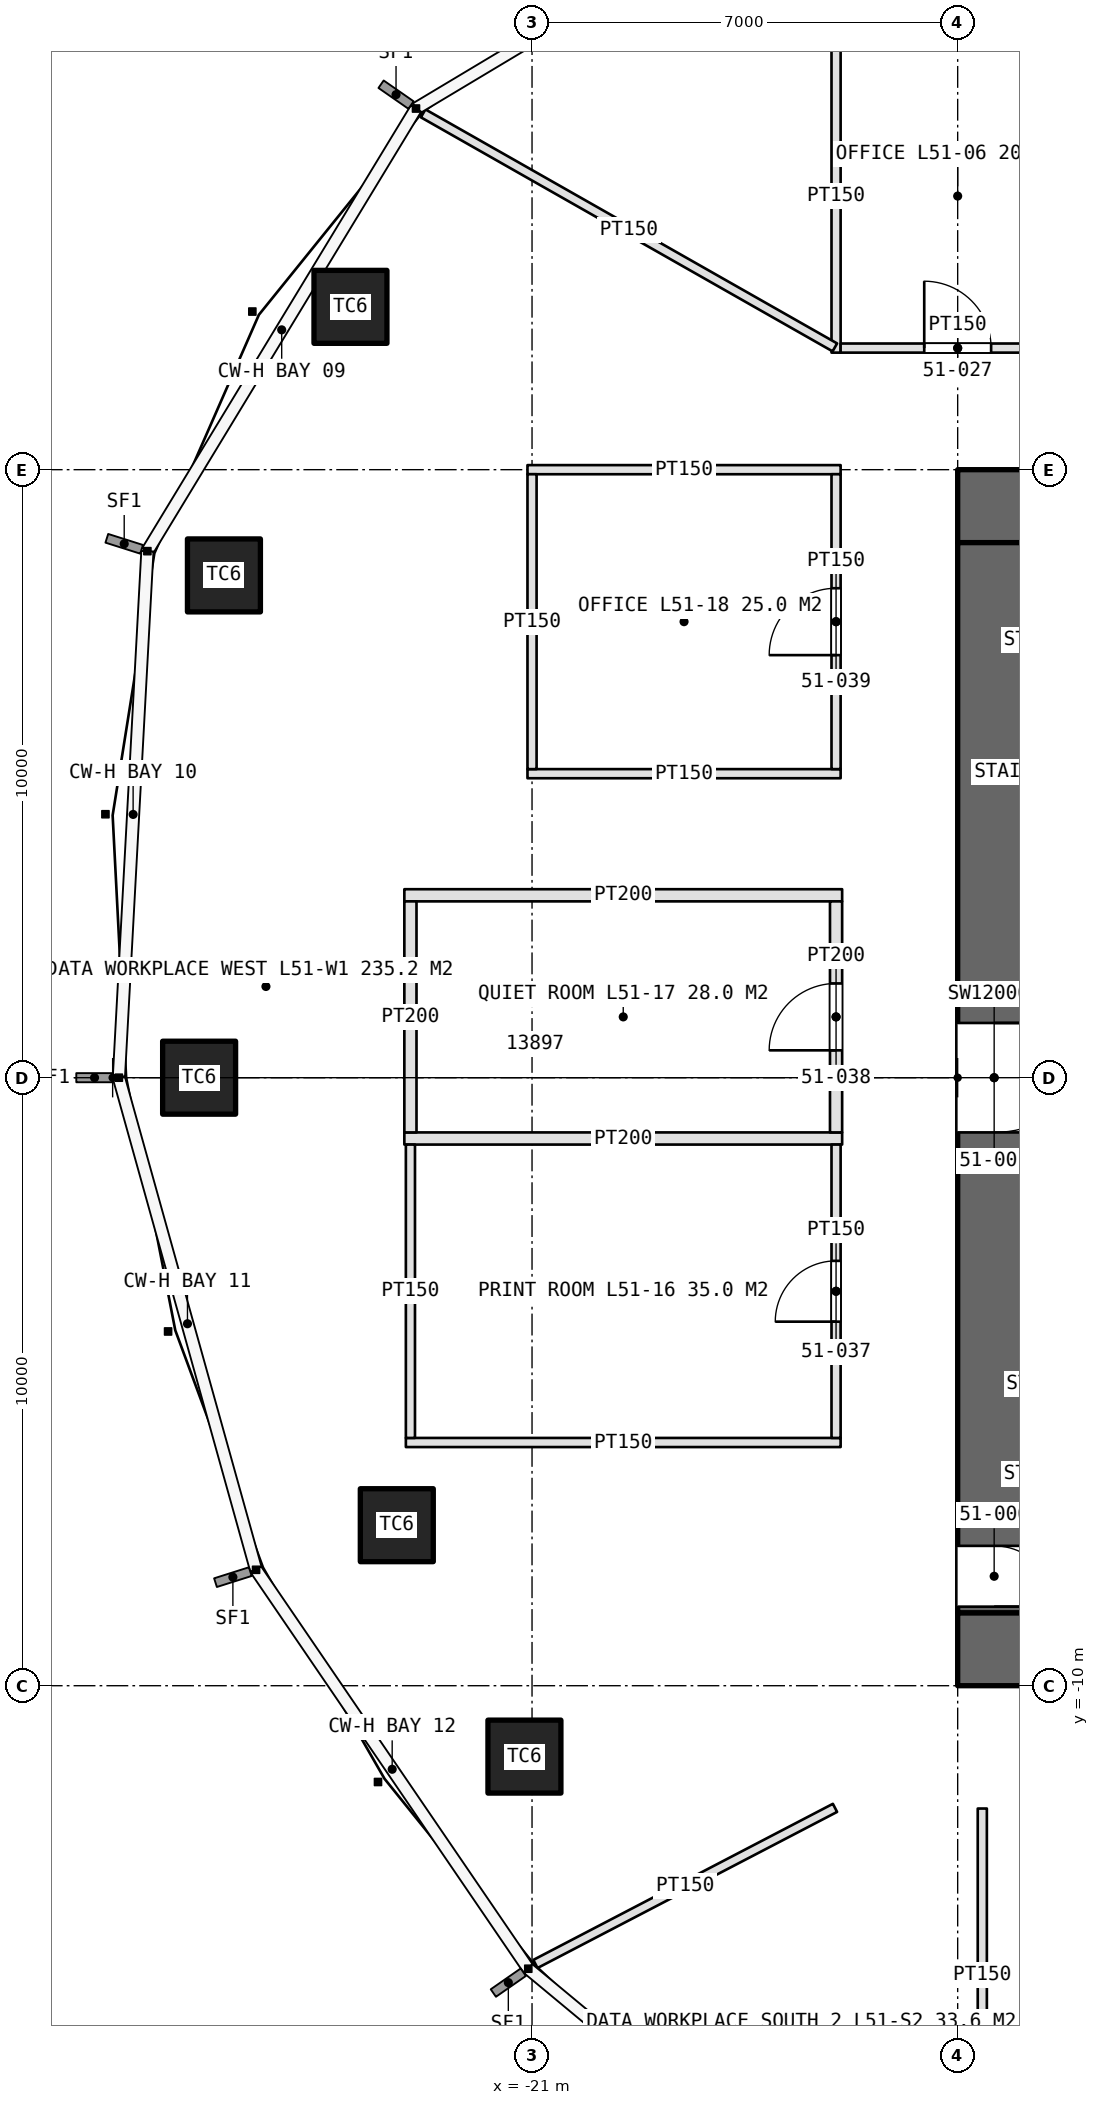
"""IFC4 building model, lengths in metres.
Left out: names, types, materials, properties, quantities, classifications, styles, units other than length and angle.
Written with IfcOpenShell. Run it as: python <this file> out.ifc"""

import sys

from ifc_helpers import new_model, si_unit, direction, frame, frame_2d, origin, origin_2d, place, context, subcontext, project, spatial, rectangle, extrude, element, fill, save


model = new_model("IFC4")
c1 = context("Model", 3, precision=1e-05, world=origin(), true_north=direction((0.0, 1.0)))
c2 = subcontext(c1, "Body", "Model", "MODEL_VIEW")
j1 = project(units=[si_unit("LENGTHUNIT", "METRE"), si_unit("PLANEANGLEUNIT", "RADIAN")], contexts=[c1])
p1 = place(None, origin())
s1 = spatial("IfcSite", under=j1, at=p1, CompositionType="ELEMENT")
p2 = place(p1, origin())
s2 = spatial("IfcBuilding", under=s1, at=p2, CompositionType="ELEMENT")
p3 = place(p2, frame((0.0, 0.0, 232.6)))
s3 = spatial("IfcBuildingStorey", under=s2, at=p3, CompositionType="ELEMENT", Elevation=232.6)
p4 = place(p3, frame((-14.0, -9.4, 0.0), z_axis=(0.0, 0.0, 1.0), x_axis=(1.0, 0.0, 0.0)))
e1 = element("IfcWall", 1, at=p4, inside=s3, PredefinedType="SHEAR", context=c2, shape_type="SweptSolid", body=[
    extrude(rectangle(XDim=28.0, YDim=1.2, at=frame_2d((14.0, 0.0))), origin(), (0.0, 0.0, 1.0), 4.2),
])
p5 = place(p4, frame((22.9, 0.0, 0.0)))
e2 = element("IfcOpeningElement", 2, at=p5, cuts=e1, PredefinedType="OPENING", context=c2, shape_type="SweptSolid", body=[
    extrude(rectangle(XDim=2.2, YDim=2.7, at=frame_2d((1.1, 1.35))), frame((0.0, 0.61, 0.0), z_axis=(0.0, -1.0, 0.0), x_axis=(1.0, 0.0, 0.0)), (0.0, 0.0, 1.0), 1.22),
])
p6 = place(p3, frame((14.0, 9.4, 0.0), z_axis=(0.0, 0.0, 1.0), x_axis=(-1.0, 0.0, 0.0)))
e3 = element("IfcWall", 3, at=p6, inside=s3, PredefinedType="SHEAR", context=c2, shape_type="SweptSolid", body=[
    extrude(rectangle(XDim=28.0, YDim=1.2, at=frame_2d((14.0, 0.0))), origin(), (0.0, 0.0, 1.0), 4.2),
])
p7 = place(p6, frame((24.0, 0.0, 0.0)))
e4 = element("IfcOpeningElement", 4, at=p7, cuts=e3, PredefinedType="OPENING", context=c2, shape_type="SweptSolid", body=[
    extrude(rectangle(XDim=1.0, YDim=2.4, at=frame_2d((0.5, 1.2))), frame((0.0, 0.61, 0.0), z_axis=(0.0, -1.0, 0.0), x_axis=(1.0, 0.0, 0.0)), (0.0, 0.0, 1.0), 1.22),
])
p8 = place(p3, frame((-13.4, 8.8, 0.0), z_axis=(0.0, 0.0, 1.0), x_axis=(0.0, -1.0, 0.0)))
e5 = element("IfcWall", 5, at=p8, inside=s3, PredefinedType="SHEAR", context=c2, shape_type="SweptSolid", body=[
    extrude(rectangle(XDim=17.6, YDim=1.2, at=frame_2d((8.8, 0.0))), origin(), (0.0, 0.0, 1.0), 4.2),
])
p9 = place(p8, frame((7.9, 0.0, 0.0)))
e6 = element("IfcOpeningElement", 6, at=p9, cuts=e5, PredefinedType="OPENING", context=c2, shape_type="SweptSolid", body=[
    extrude(rectangle(XDim=1.8, YDim=2.4, at=frame_2d((0.9, 1.2))), frame((0.0, 0.61, 0.0), z_axis=(0.0, -1.0, 0.0), x_axis=(1.0, 0.0, 0.0)), (0.0, 0.0, 1.0), 1.22),
])
p10 = place(p8, frame((16.5, 0.0, 0.0)))
e7 = element("IfcOpeningElement", 7, at=p10, cuts=e5, PredefinedType="OPENING", context=c2, shape_type="SweptSolid", body=[
    extrude(rectangle(XDim=1.0, YDim=2.4, at=frame_2d((0.5, 1.2))), frame((0.0, 0.61, 0.0), z_axis=(0.0, -1.0, 0.0), x_axis=(1.0, 0.0, 0.0)), (0.0, 0.0, 1.0), 1.22),
])
for number, where, z_axis, x_axis in (
    (8, (-23.986, 12.678, 0.0), (0.0, 0.0, 1.0), (1.0, 0.0, 0.0)),
    (9, (-26.067, 8.261, 0.0), (0.0, 0.0, 1.0), (1.0, 0.0, 0.0)),
    (10, (-26.475, 0.0, 0.0), (0.0, 0.0, 1.0), (1.0, 0.0, 0.0)),
    (11, (-23.224, -7.36, 0.0), (0.0, 0.0, 1.0), (1.0, 0.0, 0.0)),
    (12, (-21.125, -11.166, 0.0), (0.0, 0.0, 1.0), (1.0, 0.0, 0.0)),
):
    element("IfcColumn", number, at=place(p3, frame(where, z_axis=z_axis, x_axis=x_axis)), inside=s3, PredefinedType="COLUMN", context=c2, shape_type="SweptSolid", body=[
        extrude(rectangle(XDim=1.2, YDim=1.2, at=origin_2d()), origin(), (0.0, 0.0, 1.0), 4.2),
    ])
p11 = place(p3, frame((-16.0, 11.925, 0.0), z_axis=(0.0, 0.0, 1.0), x_axis=(0.0, 1.0, 0.0)))
e13 = element("IfcWall", 13, at=p11, inside=s3, PredefinedType="PARTITIONING", context=c2, shape_type="SweptSolid", body=[
    extrude(rectangle(XDim=5.15, YDim=0.15, at=frame_2d((2.575, 0.0))), origin(), (0.0, 0.0, 1.0), 3.0),
])
p12 = place(p3, frame((-15.925, 12.0, 0.0), z_axis=(0.0, 0.0, 1.0), x_axis=(1.0, 0.0, 0.0)))
e14 = element("IfcWall", 14, at=p12, inside=s3, PredefinedType="PARTITIONING", context=c2, shape_type="SweptSolid", body=[
    extrude(rectangle(XDim=3.85, YDim=0.15, at=frame_2d((1.925, 0.0))), origin(), (0.0, 0.0, 1.0), 3.0),
])
p13 = place(p12, frame((1.375, 0.0, 0.0)))
e15 = element("IfcOpeningElement", 15, at=p13, cuts=e14, PredefinedType="OPENING", context=c2, shape_type="SweptSolid", body=[
    extrude(rectangle(XDim=1.1, YDim=2.3, at=frame_2d((0.55, 1.15))), frame((0.0, 0.085, 0.0), z_axis=(0.0, -1.0, 0.0), x_axis=(1.0, 0.0, 0.0)), (0.0, 0.0, 1.0), 0.17),
])
p14 = place(p3, frame((-15.925, -6.0, 0.0), z_axis=(0.0, 0.0, 1.0), x_axis=(-1.0, 0.0, 0.0)))
e16 = element("IfcWall", 16, at=p14, inside=s3, PredefinedType="PARTITIONING", context=c2, shape_type="SweptSolid", body=[
    extrude(rectangle(XDim=7.15, YDim=0.15, at=frame_2d((3.575, 0.0))), origin(), (0.0, 0.0, 1.0), 3.0),
])
for number, where, z_axis, x_axis in (
    (17, (-15.9, -1.0, 0.0), (0.0, 0.0, 1.0), (-1.0, 0.0, 0.0)),
    (18, (-15.9, 3.0, 0.0), (0.0, 0.0, 1.0), (-1.0, 0.0, 0.0)),
):
    element("IfcWall", number, at=place(p3, frame(where, z_axis=z_axis, x_axis=x_axis)), inside=s3, PredefinedType="PARTITIONING", context=c2, shape_type="SweptSolid", body=[
        extrude(rectangle(XDim=7.2, YDim=0.2, at=frame_2d((3.6, 0.0))), origin(), (0.0, 0.0, 1.0), 3.0),
    ])
p15 = place(p3, frame((-16.0, -5.925, 0.0), z_axis=(0.0, 0.0, 1.0), x_axis=(0.0, 1.0, 0.0)))
e19 = element("IfcWall", 19, at=p15, inside=s3, PredefinedType="PARTITIONING", context=c2, shape_type="SweptSolid", body=[
    extrude(rectangle(XDim=4.825, YDim=0.15, at=frame_2d((2.413, 0.0))), origin(), (0.0, 0.0, 1.0), 3.0),
])
p16 = place(p15, frame((1.913, 0.0, 0.0)))
e20 = element("IfcOpeningElement", 20, at=p16, cuts=e19, PredefinedType="OPENING", context=c2, shape_type="SweptSolid", body=[
    extrude(rectangle(XDim=1.0, YDim=2.2, at=frame_2d((0.5, 1.1))), frame((0.0, 0.085, 0.0), z_axis=(0.0, -1.0, 0.0), x_axis=(1.0, 0.0, 0.0)), (0.0, 0.0, 1.0), 0.17),
])
p17 = place(p3, frame((-23.0, -5.925, 0.0), z_axis=(0.0, 0.0, 1.0), x_axis=(0.0, 1.0, 0.0)))
e21 = element("IfcWall", 21, at=p17, inside=s3, PredefinedType="PARTITIONING", context=c2, shape_type="SweptSolid", body=[
    extrude(rectangle(XDim=4.825, YDim=0.15, at=frame_2d((2.413, 0.0))), origin(), (0.0, 0.0, 1.0), 3.0),
])
p18 = place(p3, frame((-16.0, -0.9, 0.0), z_axis=(0.0, 0.0, 1.0), x_axis=(0.0, 1.0, 0.0)))
e22 = element("IfcWall", 22, at=p18, inside=s3, PredefinedType="PARTITIONING", context=c2, shape_type="SweptSolid", body=[
    extrude(rectangle(XDim=3.8, YDim=0.2, at=frame_2d((1.9, 0.0))), origin(), (0.0, 0.0, 1.0), 3.0),
])
p19 = place(p18, frame((1.35, 0.0, 0.0)))
e23 = element("IfcOpeningElement", 23, at=p19, cuts=e22, PredefinedType="OPENING", context=c2, shape_type="SweptSolid", body=[
    extrude(rectangle(XDim=1.1, YDim=2.3, at=frame_2d((0.55, 1.15))), frame((0.0, 0.11, 0.0), z_axis=(0.0, -1.0, 0.0), x_axis=(1.0, 0.0, 0.0)), (0.0, 0.0, 1.0), 0.22),
])
p20 = place(p3, frame((-23.0, -0.9, 0.0), z_axis=(0.0, 0.0, 1.0), x_axis=(0.0, 1.0, 0.0)))
e24 = element("IfcWall", 24, at=p20, inside=s3, PredefinedType="PARTITIONING", context=c2, shape_type="SweptSolid", body=[
    extrude(rectangle(XDim=3.8, YDim=0.2, at=frame_2d((1.9, 0.0))), origin(), (0.0, 0.0, 1.0), 3.0),
])
for number, where, z_axis, x_axis in (
    (25, (-15.925, 5.0, 0.0), (0.0, 0.0, 1.0), (-1.0, 0.0, 0.0)),
    (26, (-15.925, 10.0, 0.0), (0.0, 0.0, 1.0), (-1.0, 0.0, 0.0)),
):
    element("IfcWall", number, at=place(p3, frame(where, z_axis=z_axis, x_axis=x_axis)), inside=s3, PredefinedType="PARTITIONING", context=c2, shape_type="SweptSolid", body=[
        extrude(rectangle(XDim=5.15, YDim=0.15, at=frame_2d((2.575, 0.0))), origin(), (0.0, 0.0, 1.0), 3.0),
    ])
p21 = place(p3, frame((-16.0, 5.075, 0.0), z_axis=(0.0, 0.0, 1.0), x_axis=(0.0, 1.0, 0.0)))
e27 = element("IfcWall", 27, at=p21, inside=s3, PredefinedType="PARTITIONING", context=c2, shape_type="SweptSolid", body=[
    extrude(rectangle(XDim=4.85, YDim=0.15, at=frame_2d((2.425, 0.0))), origin(), (0.0, 0.0, 1.0), 3.0),
])
p22 = place(p21, frame((1.875, 0.0, 0.0)))
e28 = element("IfcOpeningElement", 28, at=p22, cuts=e27, PredefinedType="OPENING", context=c2, shape_type="SweptSolid", body=[
    extrude(rectangle(XDim=1.1, YDim=2.3, at=frame_2d((0.55, 1.15))), frame((0.0, 0.085, 0.0), z_axis=(0.0, -1.0, 0.0), x_axis=(1.0, 0.0, 0.0)), (0.0, 0.0, 1.0), 0.17),
])
p23 = place(p3, frame((-21.0, 5.075, 0.0), z_axis=(0.0, 0.0, 1.0), x_axis=(0.0, 1.0, 0.0)))
e29 = element("IfcWall", 29, at=p23, inside=s3, PredefinedType="PARTITIONING", context=c2, shape_type="SweptSolid", body=[
    extrude(rectangle(XDim=4.85, YDim=0.15, at=frame_2d((2.425, 0.0))), origin(), (0.0, 0.0, 1.0), 3.0),
])
p24 = place(p3, frame((-16.018, -12.009, 0.0), z_axis=(0.0, 0.0, 1.0), x_axis=(-0.886831549241, -0.462092851351, 0.0)))
e30 = element("IfcWall", 30, at=p24, inside=s3, PredefinedType="PARTITIONING", context=c2, shape_type="SweptSolid", body=[
    extrude(rectangle(XDim=5.555, YDim=0.15, at=frame_2d((2.778, 0.0))), origin(), (0.0, 0.0, 1.0), 3.0),
])
p25 = place(p3, frame((-16.02, 12.011, 0.0), z_axis=(0.0, 0.0, 1.0), x_axis=(-0.869354026591, 0.494189818238, 0.0)))
e31 = element("IfcWall", 31, at=p25, inside=s3, PredefinedType="PARTITIONING", context=c2, shape_type="SweptSolid", body=[
    extrude(rectangle(XDim=7.788, YDim=0.15, at=frame_2d((3.894, 0.0))), origin(), (0.0, 0.0, 1.0), 3.0),
])
p26 = place(p3, frame((-13.595, -12.02, 0.0), z_axis=(0.0, 0.0, 1.0), x_axis=(0.0, -1.0, 0.0)))
e32 = element("IfcWall", 32, at=p26, inside=s3, PredefinedType="PARTITIONING", context=c2, shape_type="SweptSolid", body=[
    extrude(rectangle(XDim=5.485, YDim=0.15, at=frame_2d((2.742, 0.0))), origin(), (0.0, 0.0, 1.0), 3.0),
])
p27 = place(p9, origin())
e33 = element("IfcDoor", 33, at=p27, inside=s3, OperationType="DOUBLE_DOOR_SINGLE_SWING", PredefinedType="DOOR", context=c2, shape_type="SweptSolid", body=[
    extrude(rectangle(XDim=1.8, YDim=2.4, at=frame_2d((0.9, 1.2))), frame((0.0, 0.025, 0.0), z_axis=(0.0, -1.0, 0.0), x_axis=(1.0, 0.0, 0.0)), (0.0, 0.0, 1.0), 0.05),
])
fill(e6, e33)
p28 = place(p10, origin())
e34 = element("IfcDoor", 34, at=p28, inside=s3, OperationType="SINGLE_SWING_RIGHT", PredefinedType="DOOR", context=c2, shape_type="SweptSolid", body=[
    extrude(rectangle(XDim=1.0, YDim=2.4, at=frame_2d((0.5, 1.2))), frame((0.0, 0.025, 0.0), z_axis=(0.0, -1.0, 0.0), x_axis=(1.0, 0.0, 0.0)), (0.0, 0.0, 1.0), 0.05),
])
fill(e7, e34)
p29 = place(p13, origin())
e35 = element("IfcDoor", 35, at=p29, inside=s3, OperationType="SINGLE_SWING_LEFT", PredefinedType="DOOR", context=c2, shape_type="SweptSolid", body=[
    extrude(rectangle(XDim=1.1, YDim=2.3, at=frame_2d((0.55, 1.15))), frame((0.0, 0.025, 0.0), z_axis=(0.0, -1.0, 0.0), x_axis=(1.0, 0.0, 0.0)), (0.0, 0.0, 1.0), 0.05),
])
fill(e15, e35)
p30 = place(p16, origin())
e36 = element("IfcDoor", 36, at=p30, inside=s3, OperationType="SINGLE_SWING_LEFT", PredefinedType="DOOR", context=c2, shape_type="SweptSolid", body=[
    extrude(rectangle(XDim=1.0, YDim=2.2, at=frame_2d((0.5, 1.1))), frame((0.0, 0.025, 0.0), z_axis=(0.0, -1.0, 0.0), x_axis=(1.0, 0.0, 0.0)), (0.0, 0.0, 1.0), 0.05),
])
fill(e20, e36)
p31 = place(p19, origin())
e37 = element("IfcDoor", 37, at=p31, inside=s3, OperationType="SINGLE_SWING_LEFT", PredefinedType="DOOR", context=c2, shape_type="SweptSolid", body=[
    extrude(rectangle(XDim=1.1, YDim=2.3, at=frame_2d((0.55, 1.15))), frame((0.0, 0.025, 0.0), z_axis=(0.0, -1.0, 0.0), x_axis=(1.0, 0.0, 0.0)), (0.0, 0.0, 1.0), 0.05),
])
fill(e23, e37)
p32 = place(p22, origin())
e38 = element("IfcDoor", 38, at=p32, inside=s3, OperationType="SINGLE_SWING_LEFT", PredefinedType="DOOR", context=c2, shape_type="SweptSolid", body=[
    extrude(rectangle(XDim=1.1, YDim=2.3, at=frame_2d((0.55, 1.15))), frame((0.0, 0.025, 0.0), z_axis=(0.0, -1.0, 0.0), x_axis=(1.0, 0.0, 0.0)), (0.0, 0.0, 1.0), 0.05),
])
fill(e28, e38)
save(model, sys.argv[1])
